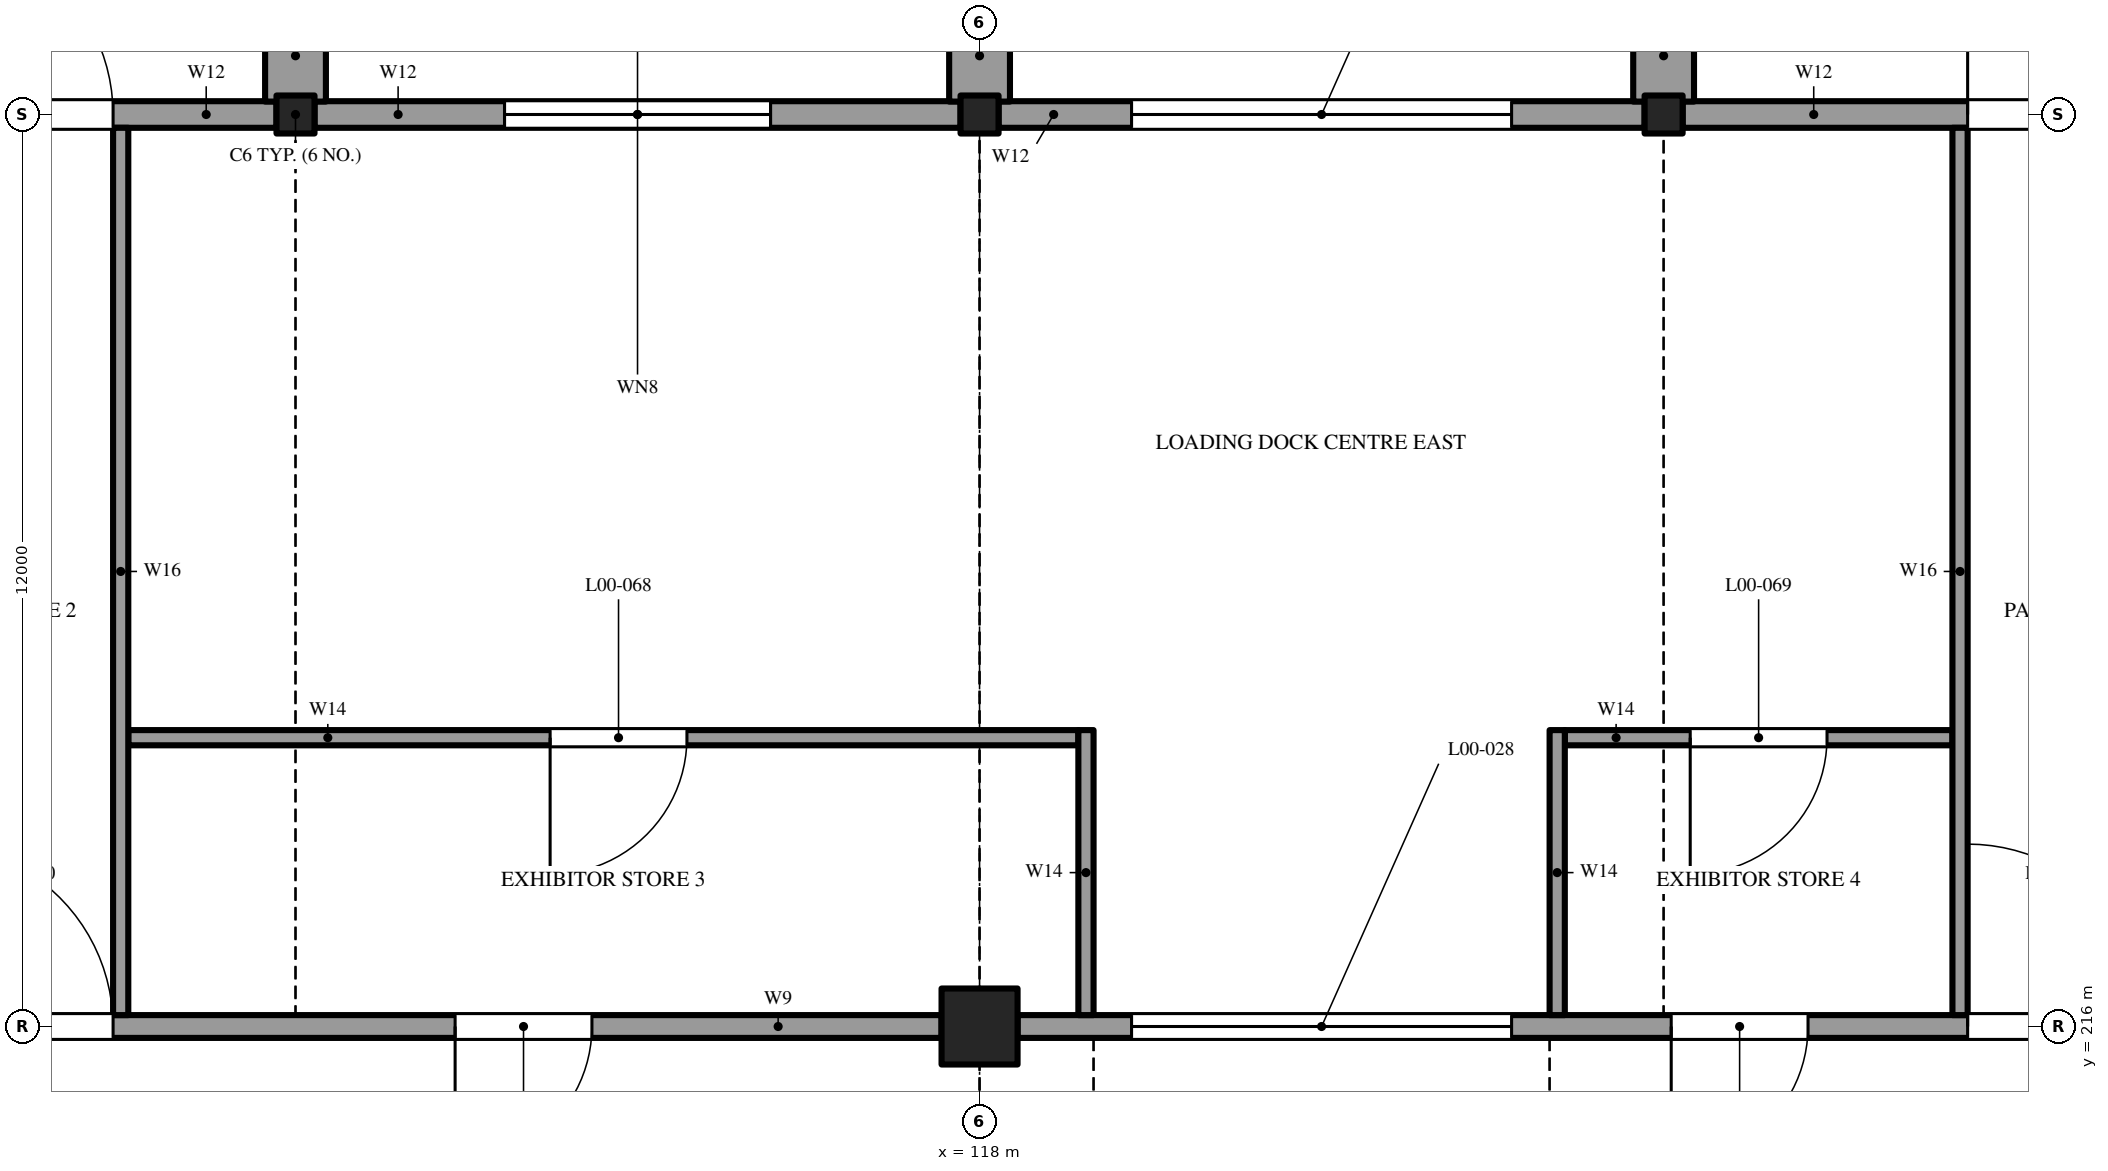
"""IFC4 building model, lengths in metres.
Left out: names, types, materials, properties, quantities, classifications, styles, units other than length and angle.
Written with IfcOpenShell. Run it as: python <this file> out.ifc"""

import sys

from ifc_helpers import new_model, si_unit, direction, frame, frame_2d, origin, origin_2d, place, context, subcontext, project, spatial, rectangle, extrude, element, fill, save


model = new_model("IFC4")
c1 = context("Model", 3, precision=1e-05, world=origin(), true_north=direction((0.0, 1.0)))
c2 = subcontext(c1, "Body", "Model", "MODEL_VIEW")
j1 = project(units=[si_unit("LENGTHUNIT", "METRE"), si_unit("PLANEANGLEUNIT", "RADIAN")], contexts=[c1])
p1 = place(None, origin())
s1 = spatial("IfcSite", under=j1, at=p1, CompositionType="ELEMENT")
p2 = place(p1, origin())
s2 = spatial("IfcBuilding", under=s1, at=p2, CompositionType="ELEMENT")
p3 = place(p2, origin())
s3 = spatial("IfcBuildingStorey", under=s2, at=p3, CompositionType="ELEMENT", Elevation=0.0)
p4 = place(p3, frame((118.0, 216.0, -0.4), z_axis=(0.0, 0.0, 1.0), x_axis=(1.0, 0.0, 0.0)))
e1 = element("IfcColumn", 1, at=p4, inside=s3, PredefinedType="COLUMN", context=c2, shape_type="SweptSolid", body=[
    extrude(rectangle(XDim=1.0, YDim=1.0, at=origin_2d()), origin(), (0.0, 0.0, 1.0), 7.6),
])
for number, where, z_axis, x_axis in (
    (2, (109.0, 228.0, -0.4), (0.0, 0.0, 1.0), (1.0, 0.0, 0.0)),
    (3, (118.0, 228.0, -0.4), (0.0, 0.0, 1.0), (1.0, 0.0, 0.0)),
    (4, (127.0, 228.0, -0.4), (0.0, 0.0, 1.0), (1.0, 0.0, 0.0)),
):
    element("IfcColumn", number, at=place(p3, frame(where, z_axis=z_axis, x_axis=x_axis)), inside=s3, PredefinedType="COLUMN", context=c2, shape_type="SweptSolid", body=[
        extrude(rectangle(XDim=0.5, YDim=0.5, at=origin_2d()), origin(), (0.0, 0.0, 1.0), 7.6),
    ])
p5 = place(p3, frame((100.5, 216.0, 0.0), z_axis=(0.0, 0.0, 1.0), x_axis=(1.0, 0.0, 0.0)))
e5 = element("IfcWall", 5, at=p5, inside=s3, PredefinedType="SOLIDWALL", context=c2, shape_type="SweptSolid", body=[
    extrude(rectangle(XDim=17.0, YDim=0.3, at=frame_2d((8.5, 0.0))), origin(), (0.0, 0.0, 1.0), 6.8),
])
p6 = place(p5, frame((10.6, 0.0, 0.0)))
e6 = element("IfcOpeningElement", 6, at=p6, cuts=e5, PredefinedType="OPENING", context=c2, shape_type="SweptSolid", body=[
    extrude(rectangle(XDim=1.8, YDim=2.4, at=frame_2d((0.9, 1.2))), frame((0.0, 0.16, 0.0), z_axis=(0.0, -1.0, 0.0), x_axis=(1.0, 0.0, 0.0)), (0.0, 0.0, 1.0), 0.32),
])
p7 = place(p5, frame((3.7, 0.0, 0.0)))
e7 = element("IfcOpeningElement", 7, at=p7, cuts=e5, PredefinedType="OPENING", context=c2, shape_type="SweptSolid", body=[
    extrude(rectangle(XDim=2.4, YDim=2.4, at=frame_2d((1.2, 1.2))), frame((0.0, 0.16, 0.0), z_axis=(0.0, -1.0, 0.0), x_axis=(1.0, 0.0, 0.0)), (0.0, 0.0, 1.0), 0.32),
])
p8 = place(p3, frame((118.5, 216.0, 0.0), z_axis=(0.0, 0.0, 1.0), x_axis=(1.0, 0.0, 0.0)))
e8 = element("IfcWall", 8, at=p8, inside=s3, PredefinedType="SOLIDWALL", context=c2, shape_type="SweptSolid", body=[
    extrude(rectangle(XDim=17.0, YDim=0.3, at=frame_2d((8.5, 0.0))), origin(), (0.0, 0.0, 1.0), 6.8),
])
p9 = place(p8, frame((8.6, 0.0, 0.0)))
e9 = element("IfcOpeningElement", 9, at=p9, cuts=e8, PredefinedType="OPENING", context=c2, shape_type="SweptSolid", body=[
    extrude(rectangle(XDim=1.8, YDim=2.4, at=frame_2d((0.9, 1.2))), frame((0.0, 0.16, 0.0), z_axis=(0.0, -1.0, 0.0), x_axis=(1.0, 0.0, 0.0)), (0.0, 0.0, 1.0), 0.32),
])
p10 = place(p8, frame((1.5, 0.0, 0.0)))
e10 = element("IfcOpeningElement", 10, at=p10, cuts=e8, PredefinedType="OPENING", context=c2, shape_type="SweptSolid", body=[
    extrude(rectangle(XDim=5.0, YDim=5.5, at=frame_2d((2.5, 2.75))), frame((0.0, 0.16, 0.0), z_axis=(0.0, -1.0, 0.0), x_axis=(1.0, 0.0, 0.0)), (0.0, 0.0, 1.0), 0.32),
])
p11 = place(p8, frame((12.5, 0.0, 0.0)))
e11 = element("IfcOpeningElement", 11, at=p11, cuts=e8, PredefinedType="OPENING", context=c2, shape_type="SweptSolid", body=[
    extrude(rectangle(XDim=2.4, YDim=2.4, at=frame_2d((1.2, 1.2))), frame((0.0, 0.16, 0.0), z_axis=(0.0, -1.0, 0.0), x_axis=(1.0, 0.0, 0.0)), (0.0, 0.0, 1.0), 0.32),
])
p12 = place(p3, frame((100.25, 228.0, 0.0), z_axis=(0.0, 0.0, 1.0), x_axis=(1.0, 0.0, 0.0)))
e12 = element("IfcWall", 12, at=p12, inside=s3, PredefinedType="SOLIDWALL", context=c2, shape_type="SweptSolid", body=[
    extrude(rectangle(XDim=8.5, YDim=0.35, at=frame_2d((4.25, 0.0))), origin(), (0.0, 0.0, 1.0), 6.8),
])
p13 = place(p12, frame((0.15, 0.0, 0.0)))
e13 = element("IfcOpeningElement", 13, at=p13, cuts=e12, PredefinedType="OPENING", context=c2, shape_type="SweptSolid", body=[
    extrude(rectangle(XDim=3.5, YDim=4.2, at=frame_2d((1.75, 2.1))), frame((0.0, 0.185, 0.0), z_axis=(0.0, -1.0, 0.0), x_axis=(1.0, 0.0, 0.0)), (0.0, 0.0, 1.0), 0.37),
])
p14 = place(p12, frame((0.15, 0.0, 4.9)))
e14 = element("IfcOpeningElement", 14, at=p14, cuts=e12, PredefinedType="OPENING", context=c2, shape_type="SweptSolid", body=[
    extrude(rectangle(XDim=3.5, YDim=1.7, at=frame_2d((1.75, 0.85))), frame((0.0, 0.185, 0.0), z_axis=(0.0, -1.0, 0.0), x_axis=(1.0, 0.0, 0.0)), (0.0, 0.0, 1.0), 0.37),
])
p15 = place(p12, frame((3.95, 0.0, 0.0)))
e15 = element("IfcOpeningElement", 15, at=p15, cuts=e12, PredefinedType="OPENING", context=c2, shape_type="SweptSolid", body=[
    extrude(rectangle(XDim=2.4, YDim=2.2, at=frame_2d((1.2, 1.1))), frame((0.0, 0.185, 0.0), z_axis=(0.0, -1.0, 0.0), x_axis=(1.0, 0.0, 0.0)), (0.0, 0.0, 1.0), 0.37),
])
p16 = place(p3, frame((109.25, 228.0, 0.0), z_axis=(0.0, 0.0, 1.0), x_axis=(1.0, 0.0, 0.0)))
e16 = element("IfcWall", 16, at=p16, inside=s3, PredefinedType="SOLIDWALL", context=c2, shape_type="SweptSolid", body=[
    extrude(rectangle(XDim=8.5, YDim=0.35, at=frame_2d((4.25, 0.0))), origin(), (0.0, 0.0, 1.0), 6.8),
])
p17 = place(p16, frame((2.5, 0.0, 0.0)))
e17 = element("IfcOpeningElement", 17, at=p17, cuts=e16, PredefinedType="OPENING", context=c2, shape_type="SweptSolid", body=[
    extrude(rectangle(XDim=3.5, YDim=4.2, at=frame_2d((1.75, 2.1))), frame((0.0, 0.185, 0.0), z_axis=(0.0, -1.0, 0.0), x_axis=(1.0, 0.0, 0.0)), (0.0, 0.0, 1.0), 0.37),
])
p18 = place(p16, frame((2.5, 0.0, 4.9)))
e18 = element("IfcOpeningElement", 18, at=p18, cuts=e16, PredefinedType="OPENING", context=c2, shape_type="SweptSolid", body=[
    extrude(rectangle(XDim=3.5, YDim=1.7, at=frame_2d((1.75, 0.85))), frame((0.0, 0.185, 0.0), z_axis=(0.0, -1.0, 0.0), x_axis=(1.0, 0.0, 0.0)), (0.0, 0.0, 1.0), 0.37),
])
p19 = place(p3, frame((118.25, 228.0, 0.0), z_axis=(0.0, 0.0, 1.0), x_axis=(1.0, 0.0, 0.0)))
e19 = element("IfcWall", 19, at=p19, inside=s3, PredefinedType="SOLIDWALL", context=c2, shape_type="SweptSolid", body=[
    extrude(rectangle(XDim=8.5, YDim=0.35, at=frame_2d((4.25, 0.0))), origin(), (0.0, 0.0, 1.0), 6.8),
])
p20 = place(p19, frame((1.75, 0.0, 0.0)))
e20 = element("IfcOpeningElement", 20, at=p20, cuts=e19, PredefinedType="OPENING", context=c2, shape_type="SweptSolid", body=[
    extrude(rectangle(XDim=5.0, YDim=5.5, at=frame_2d((2.5, 2.75))), frame((0.0, 0.185, 0.0), z_axis=(0.0, -1.0, 0.0), x_axis=(1.0, 0.0, 0.0)), (0.0, 0.0, 1.0), 0.37),
])
p21 = place(p3, frame((127.25, 228.0, 0.0), z_axis=(0.0, 0.0, 1.0), x_axis=(1.0, 0.0, 0.0)))
e21 = element("IfcWall", 21, at=p21, inside=s3, PredefinedType="SOLIDWALL", context=c2, shape_type="SweptSolid", body=[
    extrude(rectangle(XDim=8.5, YDim=0.35, at=frame_2d((4.25, 0.0))), origin(), (0.0, 0.0, 1.0), 6.8),
])
p22 = place(p21, frame((3.75, 0.0, 0.0)))
e22 = element("IfcOpeningElement", 22, at=p22, cuts=e21, PredefinedType="OPENING", context=c2, shape_type="SweptSolid", body=[
    extrude(rectangle(XDim=2.4, YDim=2.2, at=frame_2d((1.2, 1.1))), frame((0.0, 0.185, 0.0), z_axis=(0.0, -1.0, 0.0), x_axis=(1.0, 0.0, 0.0)), (0.0, 0.0, 1.0), 0.37),
])
for number, where, z_axis, x_axis in (
    (23, (109.0, 228.17, -0.4), (0.0, 0.0, 1.0), (0.0, 1.0, 0.0)),
    (24, (118.0, 228.17, -0.4), (0.0, 0.0, 1.0), (0.0, 1.0, 0.0)),
    (25, (127.0, 228.17, -0.4), (0.0, 0.0, 1.0), (0.0, 1.0, 0.0)),
):
    element("IfcWall", number, at=place(p3, frame(where, z_axis=z_axis, x_axis=x_axis)), inside=s3, PredefinedType="SOLIDWALL", context=c2, shape_type="SweptSolid", body=[
        extrude(rectangle(XDim=1.205, YDim=0.8, at=frame_2d((0.603, 0.0))), origin(), (0.0, 0.0, 1.0), 7.6),
    ])
p23 = place(p3, frame((106.8, 219.8, 0.0), z_axis=(0.0, 0.0, 1.0), x_axis=(1.0, 0.0, 0.0)))
e26 = element("IfcWall", 26, at=p23, inside=s3, PredefinedType="SOLIDWALL", context=c2, shape_type="SweptSolid", body=[
    extrude(rectangle(XDim=12.5, YDim=0.2, at=frame_2d((6.25, 0.0))), origin(), (0.0, 0.0, 1.0), 6.8),
])
p24 = place(p23, frame((5.55, 0.0, 0.0)))
e27 = element("IfcOpeningElement", 27, at=p24, cuts=e26, PredefinedType="OPENING", context=c2, shape_type="SweptSolid", body=[
    extrude(rectangle(XDim=1.8, YDim=2.4, at=frame_2d((0.9, 1.2))), frame((0.0, 0.11, 0.0), z_axis=(0.0, -1.0, 0.0), x_axis=(1.0, 0.0, 0.0)), (0.0, 0.0, 1.0), 0.22),
])
p25 = place(p3, frame((125.7, 219.8, 0.0), z_axis=(0.0, 0.0, 1.0), x_axis=(1.0, 0.0, 0.0)))
e28 = element("IfcWall", 28, at=p25, inside=s3, PredefinedType="SOLIDWALL", context=c2, shape_type="SweptSolid", body=[
    extrude(rectangle(XDim=5.1, YDim=0.2, at=frame_2d((2.55, 0.0))), origin(), (0.0, 0.0, 1.0), 6.8),
])
p26 = place(p25, frame((1.65, 0.0, 0.0)))
e29 = element("IfcOpeningElement", 29, at=p26, cuts=e28, PredefinedType="OPENING", context=c2, shape_type="SweptSolid", body=[
    extrude(rectangle(XDim=1.8, YDim=2.4, at=frame_2d((0.9, 1.2))), frame((0.0, 0.11, 0.0), z_axis=(0.0, -1.0, 0.0), x_axis=(1.0, 0.0, 0.0)), (0.0, 0.0, 1.0), 0.22),
])
for number, where, z_axis, x_axis in (
    (30, (119.4, 216.15, 0.0), (0.0, 0.0, 1.0), (0.0, 1.0, 0.0)),
    (31, (125.6, 216.15, 0.0), (0.0, 0.0, 1.0), (0.0, 1.0, 0.0)),
):
    element("IfcWall", number, at=place(p3, frame(where, z_axis=z_axis, x_axis=x_axis)), inside=s3, PredefinedType="SOLIDWALL", context=c2, shape_type="SweptSolid", body=[
        extrude(rectangle(XDim=3.75, YDim=0.2, at=frame_2d((1.875, 0.0))), origin(), (0.0, 0.0, 1.0), 6.8),
    ])
for number, where, z_axis, x_axis in (
    (32, (106.7, 216.15, 0.0), (0.0, 0.0, 1.0), (0.0, 1.0, 0.0)),
    (33, (130.9, 216.15, 0.0), (0.0, 0.0, 1.0), (0.0, 1.0, 0.0)),
):
    element("IfcWall", number, at=place(p3, frame(where, z_axis=z_axis, x_axis=x_axis)), inside=s3, PredefinedType="SOLIDWALL", context=c2, shape_type="SweptSolid", body=[
        extrude(rectangle(XDim=11.675, YDim=0.2, at=frame_2d((5.837, 0.0))), origin(), (0.0, 0.0, 1.0), 6.8),
    ])
p27 = place(p6, frame((1.8, 0.0, 0.0), z_axis=(0.0, 0.0, 1.0), x_axis=(-1.0, 0.0, 0.0)))
e34 = element("IfcDoor", 34, at=p27, inside=s3, OperationType="DOUBLE_DOOR_SINGLE_SWING", PredefinedType="DOOR", context=c2, shape_type="SweptSolid", body=[
    extrude(rectangle(XDim=1.8, YDim=2.4, at=frame_2d((0.9, 1.2))), frame((0.0, 0.025, 0.0), z_axis=(0.0, -1.0, 0.0), x_axis=(1.0, 0.0, 0.0)), (0.0, 0.0, 1.0), 0.05),
])
fill(e6, e34)
p28 = place(p9, frame((1.8, 0.0, 0.0), z_axis=(0.0, 0.0, 1.0), x_axis=(-1.0, 0.0, 0.0)))
e35 = element("IfcDoor", 35, at=p28, inside=s3, OperationType="DOUBLE_DOOR_SINGLE_SWING", PredefinedType="DOOR", context=c2, shape_type="SweptSolid", body=[
    extrude(rectangle(XDim=1.8, YDim=2.4, at=frame_2d((0.9, 1.2))), frame((0.0, 0.025, 0.0), z_axis=(0.0, -1.0, 0.0), x_axis=(1.0, 0.0, 0.0)), (0.0, 0.0, 1.0), 0.05),
])
fill(e9, e35)
p29 = place(p10, origin())
e36 = element("IfcDoor", 36, at=p29, inside=s3, OperationType="ROLLINGUP", PredefinedType="DOOR", context=c2, shape_type="SweptSolid", body=[
    extrude(rectangle(XDim=5.0, YDim=5.5, at=frame_2d((2.5, 2.75))), frame((0.0, 0.025, 0.0), z_axis=(0.0, -1.0, 0.0), x_axis=(1.0, 0.0, 0.0)), (0.0, 0.0, 1.0), 0.05),
])
fill(e10, e36)
p30 = place(p7, origin())
e37 = element("IfcDoor", 37, at=p30, inside=s3, OperationType="DOUBLE_DOOR_SINGLE_SWING", PredefinedType="DOOR", context=c2, shape_type="SweptSolid", body=[
    extrude(rectangle(XDim=2.4, YDim=2.4, at=frame_2d((1.2, 1.2))), frame((0.0, 0.025, 0.0), z_axis=(0.0, -1.0, 0.0), x_axis=(1.0, 0.0, 0.0)), (0.0, 0.0, 1.0), 0.05),
])
fill(e7, e37)
p31 = place(p11, origin())
e38 = element("IfcDoor", 38, at=p31, inside=s3, OperationType="DOUBLE_DOOR_SINGLE_SWING", PredefinedType="DOOR", context=c2, shape_type="SweptSolid", body=[
    extrude(rectangle(XDim=2.4, YDim=2.4, at=frame_2d((1.2, 1.2))), frame((0.0, 0.025, 0.0), z_axis=(0.0, -1.0, 0.0), x_axis=(1.0, 0.0, 0.0)), (0.0, 0.0, 1.0), 0.05),
])
fill(e11, e38)
p32 = place(p17, origin())
e39 = element("IfcDoor", 39, at=p32, inside=s3, OperationType="ROLLINGUP", PredefinedType="DOOR", context=c2, shape_type="SweptSolid", body=[
    extrude(rectangle(XDim=3.5, YDim=4.2, at=frame_2d((1.75, 2.1))), frame((0.0, 0.025, 0.0), z_axis=(0.0, -1.0, 0.0), x_axis=(1.0, 0.0, 0.0)), (0.0, 0.0, 1.0), 0.05),
])
fill(e17, e39)
p33 = place(p18, origin())
e40 = element("IfcWindow", 40, at=p33, inside=s3, PartitioningType="SINGLE_PANEL", PredefinedType="WINDOW", context=c2, shape_type="SweptSolid", body=[
    extrude(rectangle(XDim=3.5, YDim=1.7, at=frame_2d((1.75, 0.85))), frame((0.0, 0.03, 0.0), z_axis=(0.0, -1.0, 0.0), x_axis=(1.0, 0.0, 0.0)), (0.0, 0.0, 1.0), 0.06),
])
fill(e18, e40)
p34 = place(p20, origin())
e41 = element("IfcDoor", 41, at=p34, inside=s3, OperationType="ROLLINGUP", PredefinedType="DOOR", context=c2, shape_type="SweptSolid", body=[
    extrude(rectangle(XDim=5.0, YDim=5.5, at=frame_2d((2.5, 2.75))), frame((0.0, 0.025, 0.0), z_axis=(0.0, -1.0, 0.0), x_axis=(1.0, 0.0, 0.0)), (0.0, 0.0, 1.0), 0.05),
])
fill(e20, e41)
p35 = place(p15, origin())
e42 = element("IfcDoor", 42, at=p35, inside=s3, OperationType="DOUBLE_DOOR_SINGLE_SWING", PredefinedType="DOOR", context=c2, shape_type="SweptSolid", body=[
    extrude(rectangle(XDim=2.4, YDim=2.2, at=frame_2d((1.2, 1.1))), frame((0.0, 0.025, 0.0), z_axis=(0.0, -1.0, 0.0), x_axis=(1.0, 0.0, 0.0)), (0.0, 0.0, 1.0), 0.05),
])
fill(e15, e42)
p36 = place(p22, origin())
e43 = element("IfcDoor", 43, at=p36, inside=s3, OperationType="DOUBLE_DOOR_SINGLE_SWING", PredefinedType="DOOR", context=c2, shape_type="SweptSolid", body=[
    extrude(rectangle(XDim=2.4, YDim=2.2, at=frame_2d((1.2, 1.1))), frame((0.0, 0.025, 0.0), z_axis=(0.0, -1.0, 0.0), x_axis=(1.0, 0.0, 0.0)), (0.0, 0.0, 1.0), 0.05),
])
fill(e22, e43)
p37 = place(p24, frame((1.8, 0.0, 0.0), z_axis=(0.0, 0.0, 1.0), x_axis=(-1.0, 0.0, 0.0)))
e44 = element("IfcDoor", 44, at=p37, inside=s3, OperationType="DOUBLE_DOOR_SINGLE_SWING", PredefinedType="DOOR", context=c2, shape_type="SweptSolid", body=[
    extrude(rectangle(XDim=1.8, YDim=2.4, at=frame_2d((0.9, 1.2))), frame((0.0, 0.025, 0.0), z_axis=(0.0, -1.0, 0.0), x_axis=(1.0, 0.0, 0.0)), (0.0, 0.0, 1.0), 0.05),
])
fill(e27, e44)
p38 = place(p26, frame((1.8, 0.0, 0.0), z_axis=(0.0, 0.0, 1.0), x_axis=(-1.0, 0.0, 0.0)))
e45 = element("IfcDoor", 45, at=p38, inside=s3, OperationType="DOUBLE_DOOR_SINGLE_SWING", PredefinedType="DOOR", context=c2, shape_type="SweptSolid", body=[
    extrude(rectangle(XDim=1.8, YDim=2.4, at=frame_2d((0.9, 1.2))), frame((0.0, 0.025, 0.0), z_axis=(0.0, -1.0, 0.0), x_axis=(1.0, 0.0, 0.0)), (0.0, 0.0, 1.0), 0.05),
])
fill(e29, e45)
save(model, sys.argv[1])
